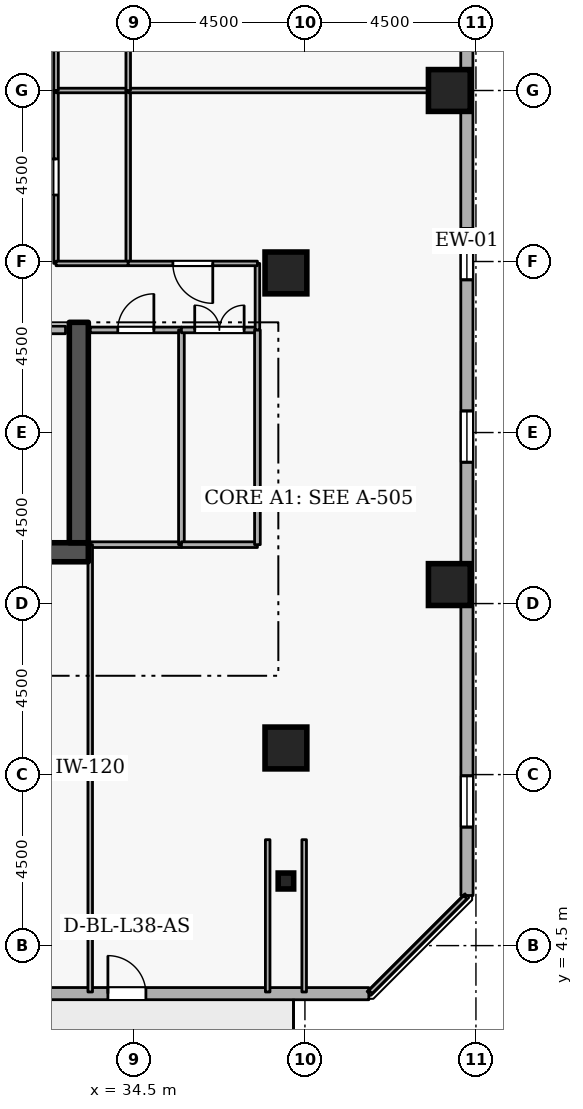
"""IFC4 building model, lengths in metres.
Left out: names, types, materials, properties, quantities, classifications, styles, units other than length and angle.
Written with IfcOpenShell. Run it as: python <this file> out.ifc"""

import sys

from ifc_helpers import new_model, si_unit, direction, frame, frame_2d, origin, origin_2d, place, context, subcontext, project, spatial, rectangle, i_section, extrude, element, fill, save


model = new_model("IFC4")
c1 = context("Model", 3, precision=1e-05, world=origin(), true_north=direction((0.0, 1.0)))
c2 = subcontext(c1, "Body", "Model", "MODEL_VIEW")
j1 = project(units=[si_unit("LENGTHUNIT", "METRE"), si_unit("PLANEANGLEUNIT", "RADIAN")], contexts=[c1])
p1 = place(None, origin())
s1 = spatial("IfcSite", under=j1, at=p1, CompositionType="ELEMENT")
p2 = place(p1, origin())
s2 = spatial("IfcBuilding", under=s1, at=p2, CompositionType="ELEMENT")
p3 = place(p2, frame((0.0, 0.0, 145.5)))
s3 = spatial("IfcBuildingStorey", under=s2, at=p3, CompositionType="ELEMENT", Elevation=145.5)
p4 = place(p3, frame((17.7, 14.85, 0.0), z_axis=(0.0, 0.0, 1.0), x_axis=(1.0, 0.0, 0.0)))
e1 = element("IfcWall", 1, at=p4, inside=s3, PredefinedType="SHEAR", context=c2, shape_type="SweptSolid", body=[
    extrude(rectangle(XDim=15.6, YDim=0.5, at=frame_2d((7.8, 0.0))), origin(), (0.0, 0.0, 1.0), 3.6),
])
p5 = place(p3, frame((33.05, 15.1, 0.0), z_axis=(0.0, 0.0, 1.0), x_axis=(0.0, 1.0, 0.0)))
e2 = element("IfcWall", 2, at=p5, inside=s3, PredefinedType="SHEAR", context=c2, shape_type="SweptSolid", body=[
    extrude(rectangle(XDim=5.8, YDim=0.5, at=frame_2d((2.9, 0.0))), origin(), (0.0, 0.0, 1.0), 3.6),
])
for number, where, z_axis, x_axis in (
    (3, (38.5, 9.7, 0.0), (0.0, 0.0, 1.0), (1.0, 0.0, 0.0)),
    (4, (42.8, 14.0, 0.0), (0.0, 0.0, 1.0), (1.0, 0.0, 0.0)),
    (5, (42.8, 27.0, 0.0), (0.0, 0.0, 1.0), (1.0, 0.0, 0.0)),
    (6, (38.5, 22.2, 0.0), (0.0, 0.0, 1.0), (1.0, 0.0, 0.0)),
):
    element("IfcColumn", number, at=place(p3, frame(where, z_axis=z_axis, x_axis=x_axis)), inside=s3, PredefinedType="COLUMN", context=c2, shape_type="SweptSolid", body=[
        extrude(rectangle(XDim=1.1, YDim=1.1, at=origin_2d()), origin(), (0.0, 0.0, 1.0), 3.6),
    ])
p6 = place(p3, frame((38.5, 6.2, 0.0), z_axis=(0.0, 0.0, 1.0), x_axis=(1.0, 0.0, 0.0)))
e7 = element("IfcColumn", 7, at=p6, inside=s3, PredefinedType="COLUMN", context=c2, shape_type="SweptSolid", body=[
    extrude(i_section(OverallWidth=0.407, OverallDepth=0.419, WebThickness=0.031, FlangeThickness=0.049, FilletRadius=0.015, at=origin_2d()), origin(), (0.0, 0.0, 1.0), 3.6),
])
p7 = place(p3, frame((6.249, 3.242, 0.0), z_axis=(0.0, 0.0, 1.0), x_axis=(0.999999983007, -0.000184351399, 0.0)))
e8 = element("IfcWall", 8, at=p7, inside=s3, PredefinedType="STANDARD", context=c2, shape_type="SweptSolid", body=[
    extrude(rectangle(XDim=34.432, YDim=0.32, at=frame_2d((17.216, 0.0))), origin(), (0.0, 0.0, 1.0), 2.22),
])
p8 = place(p7, frame((27.566, 0.0, 0.0)))
e9 = element("IfcOpeningElement", 9, at=p8, cuts=e8, PredefinedType="OPENING", context=c2, shape_type="SweptSolid", body=[
    extrude(rectangle(XDim=1.0, YDim=2.08, at=frame_2d((0.5, 1.04))), frame((0.0, 0.17, 0.0), z_axis=(0.0, -1.0, 0.0), x_axis=(1.0, 0.0, 0.0)), (0.0, 0.0, 1.0), 0.34),
])
p9 = place(p7, frame((1.8, 0.0, 0.72)))
e10 = element("IfcOpeningElement", 10, at=p9, cuts=e8, PredefinedType="OPENING", context=c2, shape_type="SweptSolid", body=[
    extrude(rectangle(XDim=1.35, YDim=1.05, at=frame_2d((0.675, 0.525))), frame((0.0, 0.17, 0.0), z_axis=(0.0, -1.0, 0.0), x_axis=(1.0, 0.0, 0.0)), (0.0, 0.0, 1.0), 0.34),
])
p10 = place(p7, frame((11.4, 0.0, 0.72)))
e11 = element("IfcOpeningElement", 11, at=p10, cuts=e8, PredefinedType="OPENING", context=c2, shape_type="SweptSolid", body=[
    extrude(rectangle(XDim=1.35, YDim=1.05, at=frame_2d((0.675, 0.525))), frame((0.0, 0.17, 0.0), z_axis=(0.0, -1.0, 0.0), x_axis=(1.0, 0.0, 0.0)), (0.0, 0.0, 1.0), 0.34),
])
p11 = place(p7, frame((16.2, 0.0, 0.72)))
e12 = element("IfcOpeningElement", 12, at=p11, cuts=e8, PredefinedType="OPENING", context=c2, shape_type="SweptSolid", body=[
    extrude(rectangle(XDim=1.35, YDim=1.05, at=frame_2d((0.675, 0.525))), frame((0.0, 0.17, 0.0), z_axis=(0.0, -1.0, 0.0), x_axis=(1.0, 0.0, 0.0)), (0.0, 0.0, 1.0), 0.34),
])
p12 = place(p7, frame((21.0, 0.0, 0.72)))
e13 = element("IfcOpeningElement", 13, at=p12, cuts=e8, PredefinedType="OPENING", context=c2, shape_type="SweptSolid", body=[
    extrude(rectangle(XDim=1.35, YDim=1.05, at=frame_2d((0.675, 0.525))), frame((0.0, 0.17, 0.0), z_axis=(0.0, -1.0, 0.0), x_axis=(1.0, 0.0, 0.0)), (0.0, 0.0, 1.0), 0.34),
])
p13 = place(p3, frame((43.265, 5.819, 0.0), z_axis=(0.0, 0.0, 1.0), x_axis=(-0.000184351399, 0.999999983007, 0.0)))
e14 = element("IfcWall", 14, at=p13, inside=s3, PredefinedType="STANDARD", context=c2, shape_type="SweptSolid", body=[
    extrude(rectangle(XDim=34.432, YDim=0.32, at=frame_2d((17.216, 0.0))), origin(), (0.0, 0.0, 1.0), 2.22),
])
p14 = place(p13, frame((1.8, 0.0, 0.72)))
e15 = element("IfcOpeningElement", 15, at=p14, cuts=e14, PredefinedType="OPENING", context=c2, shape_type="SweptSolid", body=[
    extrude(rectangle(XDim=1.35, YDim=1.05, at=frame_2d((0.675, 0.525))), frame((0.0, 0.17, 0.0), z_axis=(0.0, -1.0, 0.0), x_axis=(1.0, 0.0, 0.0)), (0.0, 0.0, 1.0), 0.34),
])
p15 = place(p13, frame((11.4, 0.0, 0.72)))
e16 = element("IfcOpeningElement", 16, at=p15, cuts=e14, PredefinedType="OPENING", context=c2, shape_type="SweptSolid", body=[
    extrude(rectangle(XDim=1.35, YDim=1.05, at=frame_2d((0.675, 0.525))), frame((0.0, 0.17, 0.0), z_axis=(0.0, -1.0, 0.0), x_axis=(1.0, 0.0, 0.0)), (0.0, 0.0, 1.0), 0.34),
])
p16 = place(p13, frame((16.2, 0.0, 0.72)))
e17 = element("IfcOpeningElement", 17, at=p16, cuts=e14, PredefinedType="OPENING", context=c2, shape_type="SweptSolid", body=[
    extrude(rectangle(XDim=1.35, YDim=1.05, at=frame_2d((0.675, 0.525))), frame((0.0, 0.17, 0.0), z_axis=(0.0, -1.0, 0.0), x_axis=(1.0, 0.0, 0.0)), (0.0, 0.0, 1.0), 0.34),
])
p17 = place(p13, frame((25.8, 0.0, 0.72)))
e18 = element("IfcOpeningElement", 18, at=p17, cuts=e14, PredefinedType="OPENING", context=c2, shape_type="SweptSolid", body=[
    extrude(rectangle(XDim=1.35, YDim=1.05, at=frame_2d((0.675, 0.525))), frame((0.0, 0.17, 0.0), z_axis=(0.0, -1.0, 0.0), x_axis=(1.0, 0.0, 0.0)), (0.0, 0.0, 1.0), 0.34),
])
p18 = place(p13, frame((30.6, 0.0, 0.72)))
e19 = element("IfcOpeningElement", 19, at=p18, cuts=e14, PredefinedType="OPENING", context=c2, shape_type="SweptSolid", body=[
    extrude(rectangle(XDim=1.35, YDim=1.05, at=frame_2d((0.675, 0.525))), frame((0.0, 0.17, 0.0), z_axis=(0.0, -1.0, 0.0), x_axis=(1.0, 0.0, 0.0)), (0.0, 0.0, 1.0), 0.34),
])
p19 = place(p3, frame((30.5, 20.7, 0.0), z_axis=(0.0, 0.0, 1.0), x_axis=(1.0, 0.0, 0.0)))
e20 = element("IfcWall", 20, at=p19, inside=s3, PredefinedType="STANDARD", context=c2, shape_type="SweptSolid", body=[
    extrude(rectangle(XDim=2.2, YDim=0.2, at=frame_2d((1.1, 0.0))), origin(), (0.0, 0.0, 1.0), 3.3),
])
p20 = place(p19, frame((0.525, 0.0, 0.0)))
e21 = element("IfcOpeningElement", 21, at=p20, cuts=e20, PredefinedType="OPENING", context=c2, shape_type="SweptSolid", body=[
    extrude(rectangle(XDim=1.15, YDim=2.1, at=frame_2d((0.575, 1.05))), frame((0.0, 0.11, 0.0), z_axis=(0.0, -1.0, 0.0), x_axis=(1.0, 0.0, 0.0)), (0.0, 0.0, 1.0), 0.22),
])
p21 = place(p3, frame((35.75, 15.05, 0.0), z_axis=(0.0, 0.0, 1.0), x_axis=(-1.0, 0.0, 0.0)))
e22 = element("IfcWall", 22, at=p21, inside=s3, PredefinedType="PARTITIONING", context=c2, shape_type="SweptSolid", body=[
    extrude(rectangle(XDim=2.4, YDim=0.15, at=frame_2d((1.2, 0.0))), origin(), (0.0, 0.0, 1.0), 3.3),
])
p22 = place(p3, frame((33.35, 20.7, 0.0), z_axis=(0.0, 0.0, 1.0), x_axis=(1.0, 0.0, 0.0)))
e23 = element("IfcWall", 23, at=p22, inside=s3, PredefinedType="PARTITIONING", context=c2, shape_type="SweptSolid", body=[
    extrude(rectangle(XDim=2.4, YDim=0.15, at=frame_2d((1.2, 0.0))), origin(), (0.0, 0.0, 1.0), 3.3),
])
p23 = place(p22, frame((0.725, 0.0, 0.0)))
e24 = element("IfcOpeningElement", 24, at=p23, cuts=e23, PredefinedType="OPENING", context=c2, shape_type="SweptSolid", body=[
    extrude(rectangle(XDim=0.95, YDim=2.1, at=frame_2d((0.475, 1.05))), frame((0.0, 0.085, 0.0), z_axis=(0.0, -1.0, 0.0), x_axis=(1.0, 0.0, 0.0)), (0.0, 0.0, 1.0), 0.17),
])
p24 = place(p3, frame((35.75, 20.7, 0.0), z_axis=(0.0, 0.0, 1.0), x_axis=(0.0, -1.0, 0.0)))
e25 = element("IfcWall", 25, at=p24, inside=s3, PredefinedType="PARTITIONING", context=c2, shape_type="SweptSolid", body=[
    extrude(rectangle(XDim=5.65, YDim=0.15, at=frame_2d((2.825, 0.0))), origin(), (0.0, 0.0, 1.0), 3.3),
])
p25 = place(p3, frame((37.75, 15.05, 0.0), z_axis=(0.0, 0.0, 1.0), x_axis=(-1.0, 0.0, 0.0)))
e26 = element("IfcWall", 26, at=p25, inside=s3, PredefinedType="PARTITIONING", context=c2, shape_type="SweptSolid", body=[
    extrude(rectangle(XDim=2.0, YDim=0.15, at=frame_2d((1.0, 0.0))), origin(), (0.0, 0.0, 1.0), 3.3),
])
p26 = place(p3, frame((35.75, 20.7, 0.0), z_axis=(0.0, 0.0, 1.0), x_axis=(1.0, 0.0, 0.0)))
e27 = element("IfcWall", 27, at=p26, inside=s3, PredefinedType="PARTITIONING", context=c2, shape_type="SweptSolid", body=[
    extrude(rectangle(XDim=2.0, YDim=0.15, at=frame_2d((1.0, 0.0))), origin(), (0.0, 0.0, 1.0), 3.3),
])
p27 = place(p26, frame((0.35, 0.0, 0.0)))
e28 = element("IfcOpeningElement", 28, at=p27, cuts=e27, PredefinedType="OPENING", context=c2, shape_type="SweptSolid", body=[
    extrude(rectangle(XDim=1.3, YDim=2.12, at=frame_2d((0.65, 1.06))), frame((0.0, 0.085, 0.0), z_axis=(0.0, -1.0, 0.0), x_axis=(1.0, 0.0, 0.0)), (0.0, 0.0, 1.0), 0.17),
])
p28 = place(p3, frame((37.75, 20.7, 0.0), z_axis=(0.0, 0.0, 1.0), x_axis=(0.0, -1.0, 0.0)))
e29 = element("IfcWall", 29, at=p28, inside=s3, PredefinedType="PARTITIONING", context=c2, shape_type="SweptSolid", body=[
    extrude(rectangle(XDim=5.65, YDim=0.15, at=frame_2d((2.825, 0.0))), origin(), (0.0, 0.0, 1.0), 3.3),
])
p29 = place(p3, frame((32.45, 22.45, 0.0), z_axis=(0.0, 0.0, 1.0), x_axis=(0.0, 1.0, 0.0)))
e30 = element("IfcWall", 30, at=p29, inside=s3, PredefinedType="PARTITIONING", context=c2, shape_type="SweptSolid", body=[
    extrude(rectangle(XDim=4.55, YDim=0.12, at=frame_2d((2.275, 0.0))), origin(), (0.0, 0.0, 1.0), 3.3),
])
p30 = place(p29, frame((1.8, 0.0, 0.0)))
e31 = element("IfcOpeningElement", 31, at=p30, cuts=e30, PredefinedType="OPENING", context=c2, shape_type="SweptSolid", body=[
    extrude(rectangle(XDim=0.95, YDim=2.1, at=frame_2d((0.475, 1.05))), frame((0.0, 0.07, 0.0), z_axis=(0.0, -1.0, 0.0), x_axis=(1.0, 0.0, 0.0)), (0.0, 0.0, 1.0), 0.14),
])
p31 = place(p3, frame((32.45, 27.0, 0.0), z_axis=(0.0, 0.0, 1.0), x_axis=(1.0, 0.0, 0.0)))
e32 = element("IfcWall", 32, at=p31, inside=s3, PredefinedType="PARTITIONING", context=c2, shape_type="SweptSolid", body=[
    extrude(rectangle(XDim=1.9, YDim=0.12, at=frame_2d((0.95, 0.0))), origin(), (0.0, 0.0, 1.0), 1.685),
])
p32 = place(p3, frame((34.35, 27.0, 0.0), z_axis=(0.0, 0.0, 1.0), x_axis=(0.0, -1.0, 0.0)))
e33 = element("IfcWall", 33, at=p32, inside=s3, PredefinedType="PARTITIONING", context=c2, shape_type="SweptSolid", body=[
    extrude(rectangle(XDim=4.55, YDim=0.12, at=frame_2d((2.275, 0.0))), origin(), (0.0, 0.0, 1.0), 3.3),
])
p33 = place(p3, frame((34.35, 22.45, 0.0), z_axis=(0.0, 0.0, 1.0), x_axis=(-1.0, 0.0, 0.0)))
e34 = element("IfcWall", 34, at=p33, inside=s3, PredefinedType="PARTITIONING", context=c2, shape_type="SweptSolid", body=[
    extrude(rectangle(XDim=1.9, YDim=0.12, at=frame_2d((0.95, 0.0))), origin(), (0.0, 0.0, 1.0), 3.3),
])
for number, where, z_axis, x_axis in (
    (35, (38.98, 3.28, 0.0), (0.0, 0.0, 1.0), (0.0, 1.0, 0.0)),
    (36, (38.02, 7.287, 0.0), (0.0, 0.0, 1.0), (0.0, -1.0, 0.0)),
):
    element("IfcWall", number, at=place(p3, frame(where, z_axis=z_axis, x_axis=x_axis)), inside=s3, PredefinedType="PARTITIONING", context=c2, shape_type="SweptSolid", body=[
        extrude(rectangle(XDim=4.007, YDim=0.12, at=frame_2d((2.004, 0.0))), origin(), (0.0, 0.0, 1.0), 1.685),
    ])
p34 = place(p3, frame((33.35, 3.28, 0.0), z_axis=(0.0, 0.0, 1.0), x_axis=(0.0, 1.0, 0.0)))
e37 = element("IfcWall", 37, at=p34, inside=s3, PredefinedType="PARTITIONING", context=c2, shape_type="SweptSolid", body=[
    extrude(rectangle(XDim=11.77, YDim=0.12, at=frame_2d((5.885, 0.0))), origin(), (0.0, 0.0, 1.0), 2.505),
])
p35 = place(p3, frame((37.75, 20.7, 0.0), z_axis=(0.0, 0.0, 1.0), x_axis=(0.0, 1.0, 0.0)))
e38 = element("IfcWall", 38, at=p35, inside=s3, PredefinedType="PARTITIONING", context=c2, shape_type="SweptSolid", body=[
    extrude(rectangle(XDim=1.75, YDim=0.12, at=frame_2d((0.875, 0.0))), origin(), (0.0, 0.0, 1.0), 3.3),
])
p36 = place(p3, frame((37.75, 22.45, 0.0), z_axis=(0.0, 0.0, 1.0), x_axis=(-1.0, 0.0, 0.0)))
e39 = element("IfcWall", 39, at=p36, inside=s3, PredefinedType="PARTITIONING", context=c2, shape_type="SweptSolid", body=[
    extrude(rectangle(XDim=3.4, YDim=0.12, at=frame_2d((1.7, 0.0))), origin(), (0.0, 0.0, 1.0), 3.3),
])
p37 = place(p36, frame((1.175, 0.0, 0.0)))
e40 = element("IfcOpeningElement", 40, at=p37, cuts=e39, PredefinedType="OPENING", context=c2, shape_type="SweptSolid", body=[
    extrude(rectangle(XDim=1.05, YDim=2.1, at=frame_2d((0.525, 1.05))), frame((0.0, 0.07, 0.0), z_axis=(0.0, -1.0, 0.0), x_axis=(1.0, 0.0, 0.0)), (0.0, 0.0, 1.0), 0.14),
])
p38 = place(p3, frame((34.35, 27.0, 0.0), z_axis=(0.0, 0.0, 1.0), x_axis=(1.0, 0.0, 0.0)))
e41 = element("IfcWall", 41, at=p38, inside=s3, PredefinedType="PARTITIONING", context=c2, shape_type="SweptSolid", body=[
    extrude(rectangle(XDim=8.87, YDim=0.12, at=frame_2d((4.435, 0.0))), origin(), (0.0, 0.0, 1.0), 1.685),
])
p39 = place(p3, frame((43.22, 5.775, 0.0), z_axis=(0.0, 0.0, 1.0), x_axis=(-0.707106781187, -0.707106781187, 0.0)))
e42 = element("IfcWall", 42, at=p39, inside=s3, PredefinedType="PARTITIONING", context=c2, shape_type="SweptSolid", body=[
    extrude(rectangle(XDim=3.528, YDim=0.12, at=frame_2d((1.764, 0.0))), origin(), (0.0, 0.0, 1.0), 3.3),
])
p40 = place(p3, frame((32.45, 27.0, 0.0), z_axis=(0.0, 0.0, 1.0), x_axis=(0.0, 1.0, 0.0)))
e43 = element("IfcWall", 43, at=p40, inside=s3, PredefinedType="PARTITIONING", context=c2, shape_type="SweptSolid", body=[
    extrude(rectangle(XDim=4.55, YDim=0.12, at=frame_2d((2.275, 0.0))), origin(), (0.0, 0.0, 1.0), 3.3),
])
p41 = place(p40, frame((1.8, 0.0, 0.0)))
e44 = element("IfcOpeningElement", 44, at=p41, cuts=e43, PredefinedType="OPENING", context=c2, shape_type="SweptSolid", body=[
    extrude(rectangle(XDim=0.95, YDim=2.1, at=frame_2d((0.475, 1.05))), frame((0.0, 0.07, 0.0), z_axis=(0.0, -1.0, 0.0), x_axis=(1.0, 0.0, 0.0)), (0.0, 0.0, 1.0), 0.14),
])
p42 = place(p3, frame((34.35, 31.55, 0.0), z_axis=(0.0, 0.0, 1.0), x_axis=(0.0, -1.0, 0.0)))
e45 = element("IfcWall", 45, at=p42, inside=s3, PredefinedType="PARTITIONING", context=c2, shape_type="SweptSolid", body=[
    extrude(rectangle(XDim=4.55, YDim=0.12, at=frame_2d((2.275, 0.0))), origin(), (0.0, 0.0, 1.0), 3.3),
])
p43 = place(p8, origin())
e46 = element("IfcDoor", 46, at=p43, inside=s3, OperationType="SINGLE_SWING_LEFT", PredefinedType="DOOR", context=c2, shape_type="SweptSolid", body=[
    extrude(rectangle(XDim=1.0, YDim=2.08, at=frame_2d((0.5, 1.04))), frame((0.0, 0.025, 0.0), z_axis=(0.0, -1.0, 0.0), x_axis=(1.0, 0.0, 0.0)), (0.0, 0.0, 1.0), 0.05),
])
fill(e9, e46)
p44 = place(p14, origin())
e47 = element("IfcWindow", 47, at=p44, inside=s3, PartitioningType="SINGLE_PANEL", PredefinedType="WINDOW", context=c2, shape_type="SweptSolid", body=[
    extrude(rectangle(XDim=1.35, YDim=1.05, at=frame_2d((0.675, 0.525))), frame((0.0, 0.03, 0.0), z_axis=(0.0, -1.0, 0.0), x_axis=(1.0, 0.0, 0.0)), (0.0, 0.0, 1.0), 0.06),
])
fill(e15, e47)
p45 = place(p15, origin())
e48 = element("IfcWindow", 48, at=p45, inside=s3, PartitioningType="SINGLE_PANEL", PredefinedType="WINDOW", context=c2, shape_type="SweptSolid", body=[
    extrude(rectangle(XDim=1.35, YDim=1.05, at=frame_2d((0.675, 0.525))), frame((0.0, 0.03, 0.0), z_axis=(0.0, -1.0, 0.0), x_axis=(1.0, 0.0, 0.0)), (0.0, 0.0, 1.0), 0.06),
])
fill(e16, e48)
p46 = place(p16, origin())
e49 = element("IfcWindow", 49, at=p46, inside=s3, PartitioningType="SINGLE_PANEL", PredefinedType="WINDOW", context=c2, shape_type="SweptSolid", body=[
    extrude(rectangle(XDim=1.35, YDim=1.05, at=frame_2d((0.675, 0.525))), frame((0.0, 0.03, 0.0), z_axis=(0.0, -1.0, 0.0), x_axis=(1.0, 0.0, 0.0)), (0.0, 0.0, 1.0), 0.06),
])
fill(e17, e49)
p47 = place(p23, origin())
e50 = element("IfcDoor", 50, at=p47, inside=s3, OperationType="SINGLE_SWING_RIGHT", PredefinedType="DOOR", context=c2, shape_type="SweptSolid", body=[
    extrude(rectangle(XDim=0.95, YDim=2.1, at=frame_2d((0.475, 1.05))), frame((0.0, 0.025, 0.0), z_axis=(0.0, -1.0, 0.0), x_axis=(1.0, 0.0, 0.0)), (0.0, 0.0, 1.0), 0.05),
])
fill(e24, e50)
p48 = place(p27, origin())
e51 = element("IfcDoor", 51, at=p48, inside=s3, OperationType="DOUBLE_DOOR_SINGLE_SWING", PredefinedType="DOOR", context=c2, shape_type="SweptSolid", body=[
    extrude(rectangle(XDim=1.3, YDim=2.12, at=frame_2d((0.65, 1.06))), frame((0.0, 0.025, 0.0), z_axis=(0.0, -1.0, 0.0), x_axis=(1.0, 0.0, 0.0)), (0.0, 0.0, 1.0), 0.05),
])
fill(e28, e51)
p49 = place(p30, origin())
e52 = element("IfcDoor", 52, at=p49, inside=s3, OperationType="SINGLE_SWING_RIGHT", PredefinedType="DOOR", context=c2, shape_type="SweptSolid", body=[
    extrude(rectangle(XDim=0.95, YDim=2.1, at=frame_2d((0.475, 1.05))), frame((0.0, 0.025, 0.0), z_axis=(0.0, -1.0, 0.0), x_axis=(1.0, 0.0, 0.0)), (0.0, 0.0, 1.0), 0.05),
])
fill(e31, e52)
p50 = place(p37, origin())
e53 = element("IfcDoor", 53, at=p50, inside=s3, OperationType="SINGLE_SWING_LEFT", PredefinedType="DOOR", context=c2, shape_type="SweptSolid", body=[
    extrude(rectangle(XDim=1.05, YDim=2.1, at=frame_2d((0.525, 1.05))), frame((0.0, 0.025, 0.0), z_axis=(0.0, -1.0, 0.0), x_axis=(1.0, 0.0, 0.0)), (0.0, 0.0, 1.0), 0.05),
])
fill(e40, e53)
save(model, sys.argv[1])
